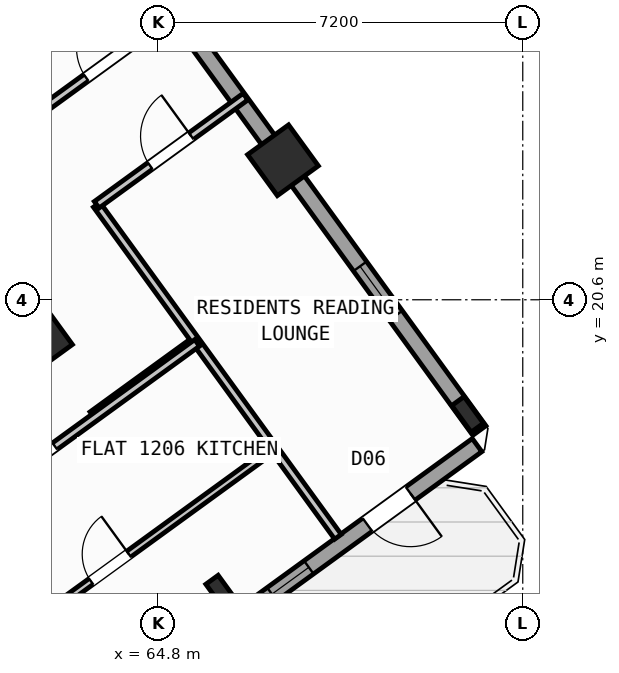
"""IFC4 building model, lengths in metres.
Left out: names, types, materials, properties, quantities, classifications, styles, units other than length and angle.
Written with IfcOpenShell. Run it as: python <this file> out.ifc"""

import sys

from ifc_helpers import new_model, si_unit, direction, frame, frame_2d, origin, origin_2d, place, context, subcontext, project, spatial, rectangle, hollow_rectangle, i_section, extrude, source, transform, mapped, element, fill, save


model = new_model("IFC4")
c1 = context("Model", 3, precision=1e-05, world=origin(), true_north=direction((0.0, 1.0)))
c2 = subcontext(c1, "Body", "Model", "MODEL_VIEW")
j1 = project(units=[si_unit("LENGTHUNIT", "METRE"), si_unit("PLANEANGLEUNIT", "RADIAN")], contexts=[c1])
p1 = place(None, origin())
s1 = spatial("IfcSite", under=j1, at=p1, CompositionType="ELEMENT")
p2 = place(p1, origin())
s2 = spatial("IfcBuilding", under=s1, at=p2, CompositionType="ELEMENT")
p3 = place(p2, frame((0.0, 0.0, 49.2)))
s3 = spatial("IfcBuildingStorey", under=s2, at=p3, CompositionType="ELEMENT", Elevation=49.2)
m1 = source(origin(), c2, "Body", "SweptSolid", [
    extrude(i_section(OverallWidth=0.3, OverallDepth=0.65, WebThickness=0.016, FlangeThickness=0.031, at=origin_2d()), origin(), (0.0, 0.0, 1.0), 3.6),
])
p4 = place(p3, frame((66.058, 14.811, 0.0), z_axis=(0.0, 0.0, 1.0), x_axis=(0.809016994375, 0.587785252292, 0.0)))
e1 = element("IfcColumn", 1, at=p4, inside=s3, PredefinedType="COLUMN", context=c2, shape_type="MappedRepresentation", body=[
    mapped(m1, transform((0.0, 0.0, 0.0), scale=1.0)),
])
m2 = source(origin(), c2, "Body", "SweptSolid", [
    extrude(hollow_rectangle(XDim=1.0, YDim=1.0, WallThickness=0.04, at=origin_2d()), origin(), (0.0, 0.0, 1.0), 3.6),
])
p5 = place(p3, frame((62.414, 19.827, 0.0), z_axis=(0.0, 0.0, 1.0), x_axis=(0.809016994375, 0.587785252292, 0.0)))
e2 = element("IfcColumn", 2, at=p5, inside=s3, PredefinedType="COLUMN", context=c2, shape_type="MappedRepresentation", body=[
    mapped(m2, transform((0.0, 0.0, 0.0), scale=1.0)),
])
p6 = place(p3, frame((70.912, 18.338, 0.0), z_axis=(0.0, 0.0, 1.0), x_axis=(0.809016994375, 0.587785252292, 0.0)))
e3 = element("IfcColumn", 3, at=p6, inside=s3, PredefinedType="COLUMN", context=c2, shape_type="MappedRepresentation", body=[
    mapped(m1, transform((0.0, 0.0, 0.0), scale=1.0)),
])
p7 = place(p3, frame((67.268, 23.354, 0.0), z_axis=(0.0, 0.0, 1.0), x_axis=(0.809016994375, 0.587785252292, 0.0)))
e4 = element("IfcColumn", 4, at=p7, inside=s3, PredefinedType="COLUMN", context=c2, shape_type="MappedRepresentation", body=[
    mapped(m2, transform((0.0, 0.0, 0.0), scale=1.0)),
])
p8 = place(p3, frame((58.455, 35.484, 0.0), z_axis=(0.0, 0.0, 1.0), x_axis=(0.587783625747, -0.809018176127, 0.0)))
e5 = element("IfcWall", 5, at=p8, inside=s3, PredefinedType="STANDARD", context=c2, shape_type="SweptSolid", body=[
    extrude(rectangle(XDim=21.587, YDim=0.32, at=frame_2d((10.794, 0.0))), origin(), (0.0, 0.0, 1.0), 2.725),
])
p9 = place(p8, frame((1.5, 0.0, 0.8)))
e6 = element("IfcOpeningElement", 6, at=p9, cuts=e5, PredefinedType="OPENING", context=c2, shape_type="SweptSolid", body=[
    extrude(rectangle(XDim=2.1, YDim=1.55, at=frame_2d((1.05, 0.775))), frame((0.0, 0.17, 0.0), z_axis=(0.0, -1.0, 0.0), x_axis=(1.0, 0.0, 0.0)), (0.0, 0.0, 1.0), 0.34),
])
p10 = place(p8, frame((5.105, 0.0, 0.85)))
e7 = element("IfcOpeningElement", 7, at=p10, cuts=e5, PredefinedType="OPENING", context=c2, shape_type="SweptSolid", body=[
    extrude(rectangle(XDim=1.5, YDim=1.5, at=frame_2d((0.75, 0.75))), frame((0.0, 0.17, 0.0), z_axis=(0.0, -1.0, 0.0), x_axis=(1.0, 0.0, 0.0)), (0.0, 0.0, 1.0), 0.34),
])
p11 = place(p8, frame((8.954, 0.0, 0.85)))
e8 = element("IfcOpeningElement", 8, at=p11, cuts=e5, PredefinedType="OPENING", context=c2, shape_type="SweptSolid", body=[
    extrude(rectangle(XDim=1.5, YDim=1.5, at=frame_2d((0.75, 0.75))), frame((0.0, 0.17, 0.0), z_axis=(0.0, -1.0, 0.0), x_axis=(1.0, 0.0, 0.0)), (0.0, 0.0, 1.0), 0.34),
])
p12 = place(p8, frame((17.581, 0.0, 0.95)))
e9 = element("IfcOpeningElement", 9, at=p12, cuts=e5, PredefinedType="OPENING", context=c2, shape_type="SweptSolid", body=[
    extrude(rectangle(XDim=1.2, YDim=1.4, at=frame_2d((0.6, 0.7))), frame((0.0, 0.17, 0.0), z_axis=(0.0, -1.0, 0.0), x_axis=(1.0, 0.0, 0.0)), (0.0, 0.0, 1.0), 0.34),
])
p13 = place(p3, frame((71.098, 17.731, 0.0), z_axis=(0.0, 0.0, 1.0), x_axis=(-0.809021120468, -0.587779573171, 0.0)))
e10 = element("IfcWall", 10, at=p13, inside=s3, PredefinedType="STANDARD", context=c2, shape_type="SweptSolid", body=[
    extrude(rectangle(XDim=17.588, YDim=0.32, at=frame_2d((8.794, 0.0))), origin(), (0.0, 0.0, 1.0), 3.35),
])
p14 = place(p13, frame((1.624, 0.0, 0.0)))
e11 = element("IfcOpeningElement", 11, at=p14, cuts=e10, PredefinedType="OPENING", context=c2, shape_type="SweptSolid", body=[
    extrude(rectangle(XDim=1.05, YDim=2.15, at=frame_2d((0.525, 1.075))), frame((0.0, 0.17, 0.0), z_axis=(0.0, -1.0, 0.0), x_axis=(1.0, 0.0, 0.0)), (0.0, 0.0, 1.0), 0.34),
])
p15 = place(p13, frame((4.104, 0.0, 1.0)))
e12 = element("IfcOpeningElement", 12, at=p15, cuts=e10, PredefinedType="OPENING", context=c2, shape_type="SweptSolid", body=[
    extrude(rectangle(XDim=0.9, YDim=1.25, at=frame_2d((0.45, 0.625))), frame((0.0, 0.17, 0.0), z_axis=(0.0, -1.0, 0.0), x_axis=(1.0, 0.0, 0.0)), (0.0, 0.0, 1.0), 0.34),
])
p16 = place(p13, frame((7.879, 0.0, 0.85)))
e13 = element("IfcOpeningElement", 13, at=p16, cuts=e10, PredefinedType="OPENING", context=c2, shape_type="SweptSolid", body=[
    extrude(rectangle(XDim=1.8, YDim=1.5, at=frame_2d((0.9, 0.75))), frame((0.0, 0.17, 0.0), z_axis=(0.0, -1.0, 0.0), x_axis=(1.0, 0.0, 0.0)), (0.0, 0.0, 1.0), 0.34),
])
p17 = place(p13, frame((12.849, 0.0, 0.85)))
e14 = element("IfcOpeningElement", 14, at=p17, cuts=e10, PredefinedType="OPENING", context=c2, shape_type="SweptSolid", body=[
    extrude(rectangle(XDim=1.8, YDim=1.5, at=frame_2d((0.9, 0.75))), frame((0.0, 0.17, 0.0), z_axis=(0.0, -1.0, 0.0), x_axis=(1.0, 0.0, 0.0)), (0.0, 0.0, 1.0), 0.34),
])
p18 = place(p3, frame((63.507, 18.322, 0.0), z_axis=(0.0, 0.0, 1.0), x_axis=(0.809034604122, 0.587761013791, 0.0)))
e15 = element("IfcWall", 15, at=p18, inside=s3, PredefinedType="PARTITIONING", context=c2, shape_type="SweptSolid", body=[
    extrude(rectangle(XDim=2.51, YDim=0.16, at=frame_2d((1.255, 0.0))), origin(), (0.0, 0.0, 1.0), 3.34),
])
p19 = place(p3, frame((68.353, 15.922, 0.0), z_axis=(0.0, 0.0, 1.0), x_axis=(-0.58776839458, 0.809029241952, 0.0)))
e16 = element("IfcWall", 16, at=p19, inside=s3, PredefinedType="PARTITIONING", context=c2, shape_type="SweptSolid", body=[
    extrude(rectangle(XDim=8.1, YDim=0.16, at=frame_2d((4.05, 0.0))), origin(), (0.0, 0.0, 1.0), 3.34),
])
p20 = place(p3, frame((63.592, 22.475, 0.0), z_axis=(0.0, 0.0, 1.0), x_axis=(0.809035546126, 0.58775971715, 0.0)))
e17 = element("IfcWall", 17, at=p20, inside=s3, PredefinedType="PARTITIONING", context=c2, shape_type="SweptSolid", body=[
    extrude(rectangle(XDim=3.63, YDim=0.16, at=frame_2d((1.815, 0.0))), origin(), (0.0, 0.0, 1.0), 3.34),
])
p21 = place(p20, frame((1.305, 0.0, 0.0)))
e18 = element("IfcOpeningElement", 18, at=p21, cuts=e17, PredefinedType="OPENING", context=c2, shape_type="SweptSolid", body=[
    extrude(rectangle(XDim=1.0, YDim=2.1, at=frame_2d((0.5, 1.05))), frame((0.0, 0.09, 0.0), z_axis=(0.0, -1.0, 0.0), x_axis=(1.0, 0.0, 0.0)), (0.0, 0.0, 1.0), 0.18),
])
p22 = place(p3, frame((62.328, 24.215, 0.0), z_axis=(0.0, 0.0, 1.0), x_axis=(0.809003564202, 0.587803736896, 0.0)))
e19 = element("IfcWall", 19, at=p22, inside=s3, PredefinedType="PARTITIONING", context=c2, shape_type="SweptSolid", body=[
    extrude(rectangle(XDim=3.63, YDim=0.16, at=frame_2d((1.815, 0.0))), origin(), (0.0, 0.0, 1.0), 3.34),
])
p23 = place(p22, frame((1.305, 0.0, 0.0)))
e20 = element("IfcOpeningElement", 20, at=p23, cuts=e19, PredefinedType="OPENING", context=c2, shape_type="SweptSolid", body=[
    extrude(rectangle(XDim=1.0, YDim=2.1, at=frame_2d((0.5, 1.05))), frame((0.0, 0.09, 0.0), z_axis=(0.0, -1.0, 0.0), x_axis=(1.0, 0.0, 0.0)), (0.0, 0.0, 1.0), 0.18),
])
p24 = place(p3, frame((53.705, 11.126, 0.0), z_axis=(0.0, 0.0, 1.0), x_axis=(0.809014504436, 0.587788679384, 0.0)))
e21 = element("IfcWall", 21, at=p24, inside=s3, PredefinedType="PARTITIONING", context=c2, shape_type="SweptSolid", body=[
    extrude(rectangle(XDim=14.67, YDim=0.16, at=frame_2d((7.335, 0.0))), origin(), (0.0, 0.0, 1.0), 3.34),
])
p25 = place(p24, frame((10.2, 0.0, 0.0)))
e22 = element("IfcOpeningElement", 22, at=p25, cuts=e21, PredefinedType="OPENING", context=c2, shape_type="SweptSolid", body=[
    extrude(rectangle(XDim=1.0, YDim=2.1, at=frame_2d((0.5, 1.05))), frame((0.0, 0.09, 0.0), z_axis=(0.0, -1.0, 0.0), x_axis=(1.0, 0.0, 0.0)), (0.0, 0.0, 1.0), 0.18),
])
p26 = place(p3, frame((56.249, 9.785, 0.0), z_axis=(0.0, 0.0, 1.0), x_axis=(0.809011747655, 0.587792473715, 0.0)))
e23 = element("IfcWall", 23, at=p26, inside=s3, PredefinedType="PLUMBINGWALL", context=c2, shape_type="SweptSolid", body=[
    extrude(rectangle(XDim=13.4, YDim=0.14, at=frame_2d((6.7, 0.0))), origin(), (0.0, 0.0, 1.0), 3.34),
])
p27 = place(p26, frame((8.94, 0.0, 0.0)))
e24 = element("IfcOpeningElement", 24, at=p27, cuts=e23, PredefinedType="OPENING", context=c2, shape_type="SweptSolid", body=[
    extrude(rectangle(XDim=0.92, YDim=2.08, at=frame_2d((0.46, 1.04))), frame((0.0, 0.08, 0.0), z_axis=(0.0, -1.0, 0.0), x_axis=(1.0, 0.0, 0.0)), (0.0, 0.0, 1.0), 0.16),
])
m3 = source(origin(), c2, "Body", "SweptSolid", [
    extrude(rectangle(XDim=1.05, YDim=2.15, at=frame_2d((0.525, 1.075))), frame((0.0, 0.025, 0.0), z_axis=(0.0, -1.0, 0.0), x_axis=(1.0, 0.0, 0.0)), (0.0, 0.0, 1.0), 0.05),
])
p28 = place(p14, origin())
e25 = element("IfcDoor", 25, at=p28, inside=s3, OperationType="SINGLE_SWING_LEFT", PredefinedType="DOOR", context=c2, shape_type="MappedRepresentation", body=[
    mapped(m3, transform((0.0, 0.0, 0.0), scale=1.0)),
])
fill(e11, e25)
m4 = source(origin(), c2, "Body", "SweptSolid", [
    extrude(rectangle(XDim=1.2, YDim=1.4, at=frame_2d((0.6, 0.7))), frame((0.0, 0.03, 0.0), z_axis=(0.0, -1.0, 0.0), x_axis=(1.0, 0.0, 0.0)), (0.0, 0.0, 1.0), 0.06),
])
p29 = place(p12, origin())
e26 = element("IfcWindow", 26, at=p29, inside=s3, PartitioningType="SINGLE_PANEL", PredefinedType="WINDOW", context=c2, shape_type="MappedRepresentation", body=[
    mapped(m4, transform((0.0, 0.0, 0.0), scale=1.0)),
])
fill(e9, e26)
m5 = source(origin(), c2, "Body", "SweptSolid", [
    extrude(rectangle(XDim=0.9, YDim=1.25, at=frame_2d((0.45, 0.625))), frame((0.0, 0.03, 0.0), z_axis=(0.0, -1.0, 0.0), x_axis=(1.0, 0.0, 0.0)), (0.0, 0.0, 1.0), 0.06),
])
p30 = place(p15, origin())
e27 = element("IfcWindow", 27, at=p30, inside=s3, PartitioningType="SINGLE_PANEL", PredefinedType="WINDOW", context=c2, shape_type="MappedRepresentation", body=[
    mapped(m5, transform((0.0, 0.0, 0.0), scale=1.0)),
])
fill(e12, e27)
m6 = source(origin(), c2, "Body", "SweptSolid", [
    extrude(rectangle(XDim=1.0, YDim=2.1, at=frame_2d((0.5, 1.05))), frame((0.0, 0.025, 0.0), z_axis=(0.0, -1.0, 0.0), x_axis=(1.0, 0.0, 0.0)), (0.0, 0.0, 1.0), 0.05),
])
p31 = place(p23, origin())
e28 = element("IfcDoor", 28, at=p31, inside=s3, OperationType="SINGLE_SWING_RIGHT", PredefinedType="DOOR", context=c2, shape_type="MappedRepresentation", body=[
    mapped(m6, transform((0.0, 0.0, 0.0), scale=1.0)),
])
fill(e20, e28)
p32 = place(p21, origin())
e29 = element("IfcDoor", 29, at=p32, inside=s3, OperationType="SINGLE_SWING_RIGHT", PredefinedType="DOOR", context=c2, shape_type="MappedRepresentation", body=[
    mapped(m6, transform((0.0, 0.0, 0.0), scale=1.0)),
])
fill(e18, e29)
p33 = place(p25, origin())
e30 = element("IfcDoor", 30, at=p33, inside=s3, OperationType="SINGLE_SWING_LEFT", PredefinedType="DOOR", context=c2, shape_type="MappedRepresentation", body=[
    mapped(m6, transform((0.0, 0.0, 0.0), scale=1.0)),
])
fill(e22, e30)
m7 = source(origin(), c2, "Body", "SweptSolid", [
    extrude(rectangle(XDim=0.92, YDim=2.08, at=frame_2d((0.46, 1.04))), frame((0.0, 0.025, 0.0), z_axis=(0.0, -1.0, 0.0), x_axis=(1.0, 0.0, 0.0)), (0.0, 0.0, 1.0), 0.05),
])
p34 = place(p27, origin())
e31 = element("IfcDoor", 31, at=p34, inside=s3, OperationType="SINGLE_SWING_RIGHT", PredefinedType="DOOR", context=c2, shape_type="MappedRepresentation", body=[
    mapped(m7, transform((0.0, 0.0, 0.0), scale=1.0)),
])
fill(e24, e31)
save(model, sys.argv[1])
